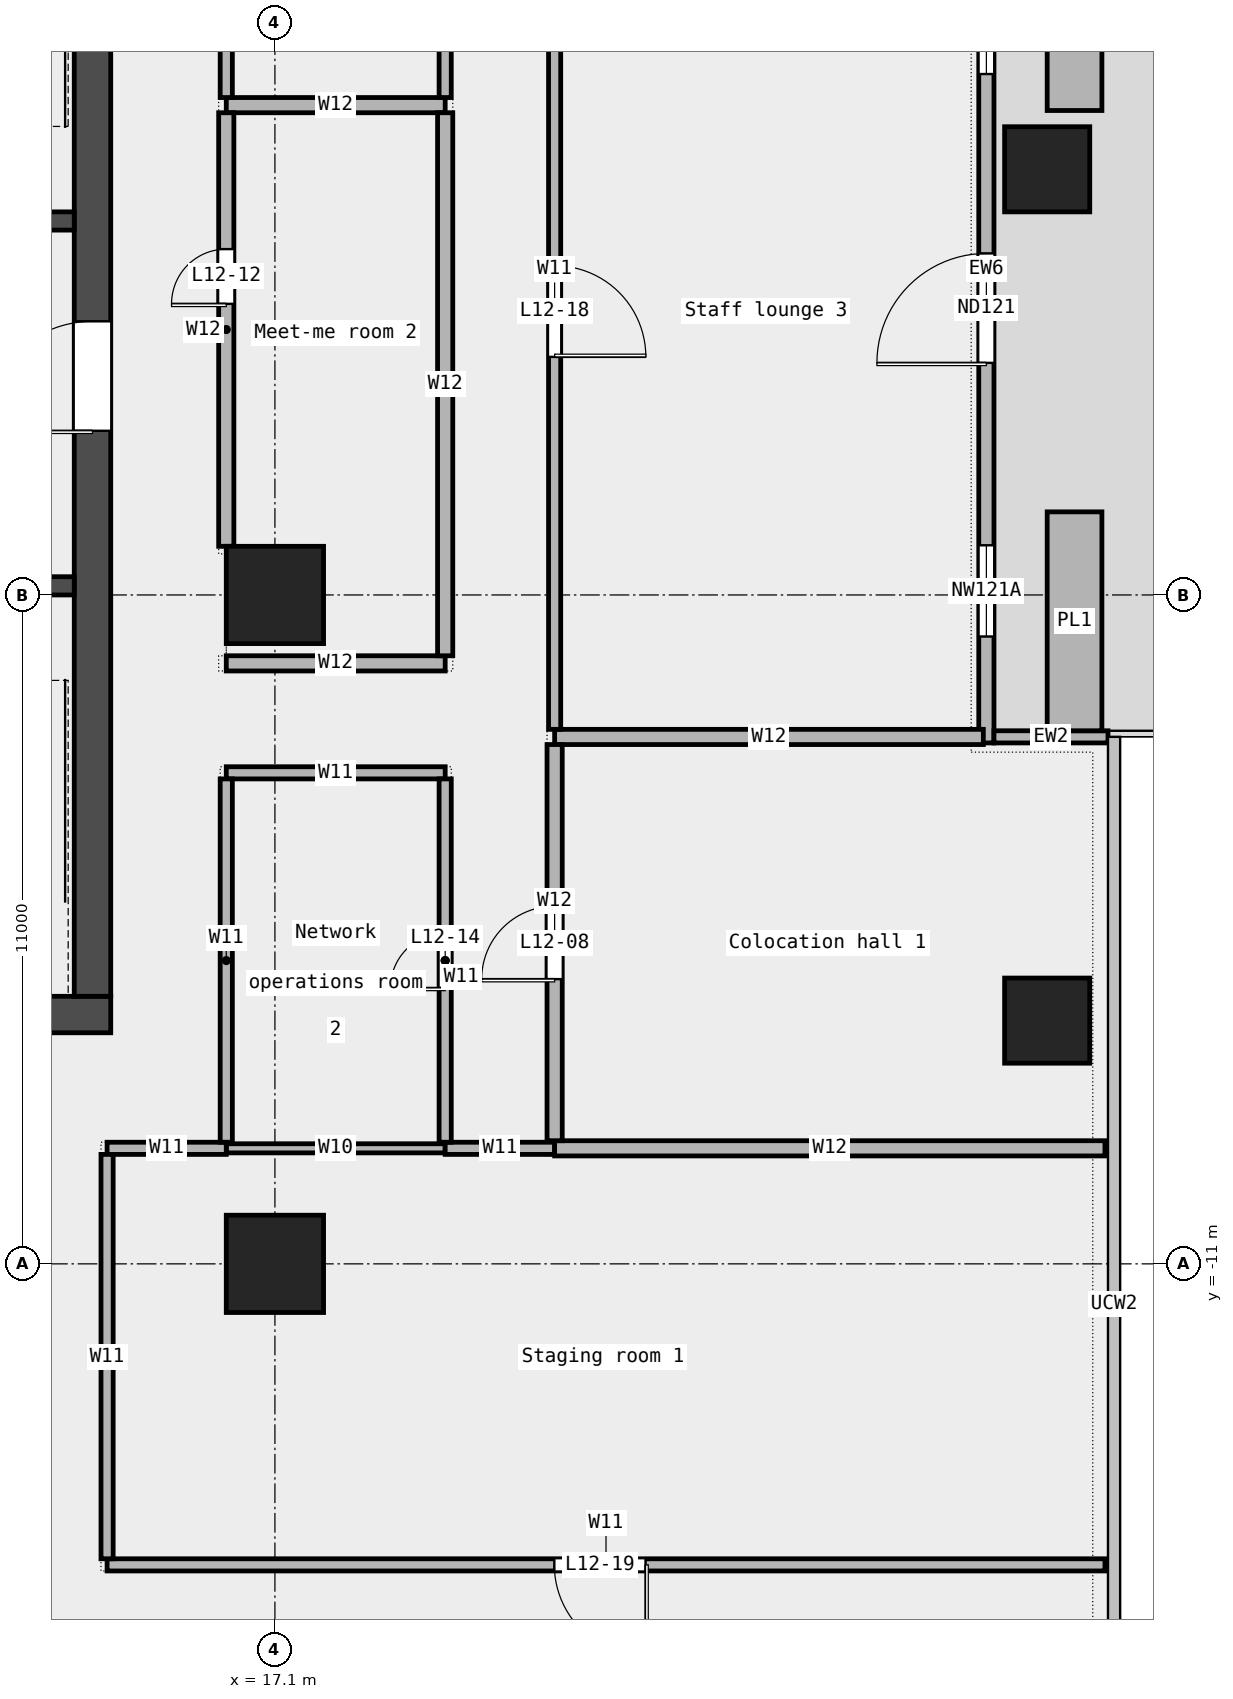
"""IFC4 building model, lengths in metres.
Left out: names, types, materials, properties, quantities, classifications, styles, units other than length and angle.
Written with IfcOpenShell. Run it as: python <this file> out.ifc"""

import sys

from ifc_helpers import new_model, si_unit, direction, frame, frame_2d, origin, origin_2d, place, context, subcontext, project, spatial, rectangle, extrude, element, fill, save


model = new_model("IFC4")
c1 = context("Model", 3, precision=1e-05, world=origin(), true_north=direction((0.0, 1.0)))
c2 = subcontext(c1, "Body", "Model", "MODEL_VIEW")
j1 = project(units=[si_unit("LENGTHUNIT", "METRE"), si_unit("PLANEANGLEUNIT", "RADIAN")], contexts=[c1])
p1 = place(None, origin())
s1 = spatial("IfcSite", under=j1, at=p1, CompositionType="ELEMENT")
p2 = place(p1, origin())
s2 = spatial("IfcBuilding", under=s1, at=p2, CompositionType="ELEMENT")
p3 = place(p2, frame((0.0, 0.0, 64.6)))
s3 = spatial("IfcBuildingStorey", under=s2, at=p3, CompositionType="ELEMENT", Elevation=64.6)
for number, where, z_axis, x_axis in (
    (1, (29.8, -7.0, 0.0), (0.0, 0.0, 1.0), (1.0, 0.0, 0.0)),
    (2, (29.8, 7.0, 0.0), (0.0, 0.0, 1.0), (1.0, 0.0, 0.0)),
):
    element("IfcColumn", number, at=place(p3, frame(where, z_axis=z_axis, x_axis=x_axis)), inside=s3, PredefinedType="COLUMN", context=c2, shape_type="SweptSolid", body=[
        extrude(rectangle(XDim=1.4, YDim=1.4, at=origin_2d()), origin(), (0.0, 0.0, 1.0), 4.35),
    ])
for number, where, z_axis, x_axis in (
    (3, (17.1, -11.0, 0.0), (0.0, 0.0, 1.0), (1.0, 0.0, 0.0)),
    (4, (17.1, 0.0, 0.0), (0.0, 0.0, 1.0), (1.0, 0.0, 0.0)),
):
    element("IfcColumn", number, at=place(p3, frame(where, z_axis=z_axis, x_axis=x_axis)), inside=s3, PredefinedType="COLUMN", context=c2, shape_type="SweptSolid", body=[
        extrude(rectangle(XDim=1.6, YDim=1.6, at=origin_2d()), origin(), (0.0, 0.0, 1.0), 4.35),
    ])
p4 = place(p3, frame((28.8, -2.433, 0.0), z_axis=(0.0, 0.0, 1.0), x_axis=(0.0, 1.0, 0.0)))
e5 = element("IfcWall", 5, at=p4, inside=s3, PredefinedType="STANDARD", context=c2, shape_type="SweptSolid", body=[
    extrude(rectangle(XDim=14.2, YDim=0.25, at=frame_2d((7.1, 0.0))), origin(), (0.0, 0.0, 1.0), 4.35),
])
p5 = place(p4, frame((1.75, 0.0, 0.45)))
e6 = element("IfcOpeningElement", 6, at=p5, cuts=e5, PredefinedType="OPENING", context=c2, shape_type="SweptSolid", body=[
    extrude(rectangle(XDim=1.5, YDim=3.0, at=frame_2d((0.75, 1.5))), frame((0.0, 0.137, 0.0), z_axis=(0.0, -1.0, 0.0), x_axis=(1.0, 0.0, 0.0)), (0.0, 0.0, 1.0), 0.274),
])
p6 = place(p4, frame((6.25, 0.0, 0.0)))
e7 = element("IfcOpeningElement", 7, at=p6, cuts=e5, PredefinedType="OPENING", context=c2, shape_type="SweptSolid", body=[
    extrude(rectangle(XDim=1.8, YDim=2.4, at=frame_2d((0.9, 1.2))), frame((0.0, 0.137, 0.0), z_axis=(0.0, -1.0, 0.0), x_axis=(1.0, 0.0, 0.0)), (0.0, 0.0, 1.0), 0.274),
])
p7 = place(p4, frame((11.0, 0.0, 0.45)))
e8 = element("IfcOpeningElement", 8, at=p7, cuts=e5, PredefinedType="OPENING", context=c2, shape_type="SweptSolid", body=[
    extrude(rectangle(XDim=1.5, YDim=3.0, at=frame_2d((0.75, 1.5))), frame((0.0, 0.137, 0.0), z_axis=(0.0, -1.0, 0.0), x_axis=(1.0, 0.0, 0.0)), (0.0, 0.0, 1.0), 0.274),
])
p8 = place(p3, frame((30.8, -2.333, 0.0), z_axis=(0.0, 0.0, 1.0), x_axis=(-1.0, 0.0, 0.0)))
e9 = element("IfcWall", 9, at=p8, inside=s3, PredefinedType="STANDARD", context=c2, shape_type="SweptSolid", body=[
    extrude(rectangle(XDim=1.875, YDim=0.2, at=frame_2d((0.938, 0.0))), origin(), (0.0, 0.0, 1.0), 4.35),
])
for number, where, z_axis, x_axis in (
    (10, (30.25, -2.233, 0.0), (0.0, 0.0, 1.0), (0.0, 1.0, 0.0)),
    (11, (30.25, 7.967, 0.0), (0.0, 0.0, 1.0), (0.0, 1.0, 0.0)),
):
    element("IfcWall", number, at=place(p3, frame(where, z_axis=z_axis, x_axis=x_axis)), inside=s3, PredefinedType="STANDARD", context=c2, shape_type="SweptSolid", body=[
        extrude(rectangle(XDim=3.6, YDim=0.9, at=frame_2d((1.8, 0.0))), origin(), (0.0, 0.0, 1.0), 0.7),
    ])
p9 = place(p3, frame((14.34, -15.95, 0.0), z_axis=(0.0, 0.0, 1.0), x_axis=(1.0, 0.0, 0.0)))
e12 = element("IfcWall", 12, at=p9, inside=s3, PredefinedType="PARTITIONING", context=c2, shape_type="SweptSolid", body=[
    extrude(rectangle(XDim=16.41, YDim=0.2, at=frame_2d((8.205, 0.0))), origin(), (0.0, 0.0, 1.0), 4.35),
])
p10 = place(p9, frame((7.355, 0.0, 0.0)))
e13 = element("IfcOpeningElement", 13, at=p10, cuts=e12, PredefinedType="OPENING", context=c2, shape_type="SweptSolid", body=[
    extrude(rectangle(XDim=1.5, YDim=2.1, at=frame_2d((0.75, 1.05))), frame((0.0, 0.112, 0.0), z_axis=(0.0, -1.0, 0.0), x_axis=(1.0, 0.0, 0.0)), (0.0, 0.0, 1.0), 0.224),
])
p11 = place(p3, frame((16.3, -9.1, 0.0), z_axis=(0.0, 0.0, 1.0), x_axis=(1.0, 0.0, 0.0)))
e14 = element("IfcWall", 14, at=p11, inside=s3, PredefinedType="PARTITIONING", context=c2, shape_type="SweptSolid", body=[
    extrude(rectangle(XDim=3.6, YDim=0.15, at=frame_2d((1.8, 0.0))), origin(), (0.0, 0.0, 1.0), 4.35),
])
p12 = place(p3, frame((14.34, -9.1, 0.0), z_axis=(0.0, 0.0, 1.0), x_axis=(1.0, 0.0, 0.0)))
e15 = element("IfcWall", 15, at=p12, inside=s3, PredefinedType="PARTITIONING", context=c2, shape_type="SweptSolid", body=[
    extrude(rectangle(XDim=1.96, YDim=0.2, at=frame_2d((0.98, 0.0))), origin(), (0.0, 0.0, 1.0), 4.35),
])
p13 = place(p3, frame((19.9, -9.1, 0.0), z_axis=(0.0, 0.0, 1.0), x_axis=(1.0, 0.0, 0.0)))
e16 = element("IfcWall", 16, at=p13, inside=s3, PredefinedType="PARTITIONING", context=c2, shape_type="SweptSolid", body=[
    extrude(rectangle(XDim=1.8, YDim=0.2, at=frame_2d((0.9, 0.0))), origin(), (0.0, 0.0, 1.0), 4.35),
])
p14 = place(p3, frame((21.7, -9.1, 0.0), z_axis=(0.0, 0.0, 1.0), x_axis=(1.0, 0.0, 0.0)))
e17 = element("IfcWall", 17, at=p14, inside=s3, PredefinedType="PARTITIONING", context=c2, shape_type="SweptSolid", body=[
    extrude(rectangle(XDim=9.05, YDim=0.25, at=frame_2d((4.525, 0.0))), origin(), (0.0, 0.0, 1.0), 4.35),
])
p15 = place(p3, frame((16.3, -2.925, 0.0), z_axis=(0.0, 0.0, 1.0), x_axis=(1.0, 0.0, 0.0)))
e18 = element("IfcWall", 18, at=p15, inside=s3, PredefinedType="PARTITIONING", context=c2, shape_type="SweptSolid", body=[
    extrude(rectangle(XDim=3.6, YDim=0.2, at=frame_2d((1.8, 0.0))), origin(), (0.0, 0.0, 1.0), 4.35),
])
p16 = place(p3, frame((21.7, -2.335, 0.0), z_axis=(0.0, 0.0, 1.0), x_axis=(1.0, 0.0, 0.0)))
e19 = element("IfcWall", 19, at=p16, inside=s3, PredefinedType="PARTITIONING", context=c2, shape_type="SweptSolid", body=[
    extrude(rectangle(XDim=7.05, YDim=0.25, at=frame_2d((3.525, 0.0))), origin(), (0.0, 0.0, 1.0), 4.35),
])
for number, where, z_axis, x_axis in (
    (20, (16.3, -1.125, 0.0), (0.0, 0.0, 1.0), (1.0, 0.0, 0.0)),
    (21, (16.3, 8.055, 0.0), (0.0, 0.0, 1.0), (1.0, 0.0, 0.0)),
):
    element("IfcWall", number, at=place(p3, frame(where, z_axis=z_axis, x_axis=x_axis)), inside=s3, PredefinedType="PARTITIONING", context=c2, shape_type="SweptSolid", body=[
        extrude(rectangle(XDim=3.6, YDim=0.25, at=frame_2d((1.8, 0.0))), origin(), (0.0, 0.0, 1.0), 4.35),
    ])
p17 = place(p3, frame((14.34, -15.85, 0.0), z_axis=(0.0, 0.0, 1.0), x_axis=(0.0, 1.0, 0.0)))
e22 = element("IfcWall", 22, at=p17, inside=s3, PredefinedType="PARTITIONING", context=c2, shape_type="SweptSolid", body=[
    extrude(rectangle(XDim=6.65, YDim=0.2, at=frame_2d((3.325, 0.0))), origin(), (0.0, 0.0, 1.0), 4.35),
])
p18 = place(p3, frame((16.3, -9.0, 0.0), z_axis=(0.0, 0.0, 1.0), x_axis=(0.0, 1.0, 0.0)))
e23 = element("IfcWall", 23, at=p18, inside=s3, PredefinedType="PARTITIONING", context=c2, shape_type="SweptSolid", body=[
    extrude(rectangle(XDim=5.975, YDim=0.2, at=frame_2d((2.988, 0.0))), origin(), (0.0, 0.0, 1.0), 4.35),
])
p19 = place(p3, frame((16.3, 8.18, 0.0), z_axis=(0.0, 0.0, 1.0), x_axis=(0.0, 1.0, 0.0)))
e24 = element("IfcWall", 24, at=p19, inside=s3, PredefinedType="PARTITIONING", context=c2, shape_type="SweptSolid", body=[
    extrude(rectangle(XDim=2.02, YDim=0.2, at=frame_2d((1.01, 0.0))), origin(), (0.0, 0.0, 1.0), 4.35),
])
p20 = place(p3, frame((16.3, 0.8, 0.0), z_axis=(0.0, 0.0, 1.0), x_axis=(0.0, 1.0, 0.0)))
e25 = element("IfcWall", 25, at=p20, inside=s3, PredefinedType="PARTITIONING", context=c2, shape_type="SweptSolid", body=[
    extrude(rectangle(XDim=7.13, YDim=0.25, at=frame_2d((3.565, 0.0))), origin(), (0.0, 0.0, 1.0), 4.35),
])
p21 = place(p20, frame((3.988, 0.0, 0.0)))
e26 = element("IfcOpeningElement", 26, at=p21, cuts=e25, PredefinedType="OPENING", context=c2, shape_type="SweptSolid", body=[
    extrude(rectangle(XDim=0.9, YDim=2.1, at=frame_2d((0.45, 1.05))), frame((0.0, 0.137, 0.0), z_axis=(0.0, -1.0, 0.0), x_axis=(1.0, 0.0, 0.0)), (0.0, 0.0, 1.0), 0.274),
])
p22 = place(p3, frame((19.9, -9.0, 0.0), z_axis=(0.0, 0.0, 1.0), x_axis=(0.0, 1.0, 0.0)))
e27 = element("IfcWall", 27, at=p22, inside=s3, PredefinedType="PARTITIONING", context=c2, shape_type="SweptSolid", body=[
    extrude(rectangle(XDim=5.975, YDim=0.2, at=frame_2d((2.988, 0.0))), origin(), (0.0, 0.0, 1.0), 4.35),
])
p23 = place(p22, frame((2.538, 0.0, 0.0)))
e28 = element("IfcOpeningElement", 28, at=p23, cuts=e27, PredefinedType="OPENING", context=c2, shape_type="SweptSolid", body=[
    extrude(rectangle(XDim=0.9, YDim=2.1, at=frame_2d((0.45, 1.05))), frame((0.0, 0.112, 0.0), z_axis=(0.0, -1.0, 0.0), x_axis=(1.0, 0.0, 0.0)), (0.0, 0.0, 1.0), 0.224),
])
p24 = place(p3, frame((19.9, 8.18, 0.0), z_axis=(0.0, 0.0, 1.0), x_axis=(0.0, 1.0, 0.0)))
e29 = element("IfcWall", 29, at=p24, inside=s3, PredefinedType="PARTITIONING", context=c2, shape_type="SweptSolid", body=[
    extrude(rectangle(XDim=7.095, YDim=0.2, at=frame_2d((3.547, 0.0))), origin(), (0.0, 0.0, 1.0), 4.35),
])
p25 = place(p24, frame((3.097, 0.0, 0.0)))
e30 = element("IfcOpeningElement", 30, at=p25, cuts=e29, PredefinedType="OPENING", context=c2, shape_type="SweptSolid", body=[
    extrude(rectangle(XDim=0.9, YDim=2.1, at=frame_2d((0.45, 1.05))), frame((0.0, 0.112, 0.0), z_axis=(0.0, -1.0, 0.0), x_axis=(1.0, 0.0, 0.0)), (0.0, 0.0, 1.0), 0.224),
])
p26 = place(p3, frame((19.9, -1.0, 0.0), z_axis=(0.0, 0.0, 1.0), x_axis=(0.0, 1.0, 0.0)))
e31 = element("IfcWall", 31, at=p26, inside=s3, PredefinedType="PARTITIONING", context=c2, shape_type="SweptSolid", body=[
    extrude(rectangle(XDim=8.93, YDim=0.25, at=frame_2d((4.465, 0.0))), origin(), (0.0, 0.0, 1.0), 4.35),
])
p27 = place(p3, frame((21.7, -2.21, 0.0), z_axis=(0.0, 0.0, 1.0), x_axis=(0.0, 1.0, 0.0)))
e32 = element("IfcWall", 32, at=p27, inside=s3, PredefinedType="PARTITIONING", context=c2, shape_type="SweptSolid", body=[
    extrude(rectangle(XDim=13.75, YDim=0.2, at=frame_2d((6.875, 0.0))), origin(), (0.0, 0.0, 1.0), 4.35),
])
p28 = place(p27, frame((6.125, 0.0, 0.0)))
e33 = element("IfcOpeningElement", 33, at=p28, cuts=e32, PredefinedType="OPENING", context=c2, shape_type="SweptSolid", body=[
    extrude(rectangle(XDim=1.5, YDim=2.1, at=frame_2d((0.75, 1.05))), frame((0.0, 0.112, 0.0), z_axis=(0.0, -1.0, 0.0), x_axis=(1.0, 0.0, 0.0)), (0.0, 0.0, 1.0), 0.224),
])
p29 = place(p3, frame((21.7, -8.975, 0.0), z_axis=(0.0, 0.0, 1.0), x_axis=(0.0, 1.0, 0.0)))
e34 = element("IfcWall", 34, at=p29, inside=s3, PredefinedType="PARTITIONING", context=c2, shape_type="SweptSolid", body=[
    extrude(rectangle(XDim=6.515, YDim=0.25, at=frame_2d((3.258, 0.0))), origin(), (0.0, 0.0, 1.0), 4.35),
])
p30 = place(p29, frame((2.657, 0.0, 0.0)))
e35 = element("IfcOpeningElement", 35, at=p30, cuts=e34, PredefinedType="OPENING", context=c2, shape_type="SweptSolid", body=[
    extrude(rectangle(XDim=1.2, YDim=2.1, at=frame_2d((0.6, 1.05))), frame((0.0, 0.137, 0.0), z_axis=(0.0, -1.0, 0.0), x_axis=(1.0, 0.0, 0.0)), (0.0, 0.0, 1.0), 0.274),
])
p31 = place(p3, frame((-14.4, -6.9, 0.0), z_axis=(0.0, 0.0, 1.0), x_axis=(1.0, 0.0, 0.0)))
e36 = element("IfcWall", 36, at=p31, inside=s3, PredefinedType="SHEAR", context=c2, shape_type="SweptSolid", body=[
    extrude(rectangle(XDim=28.8, YDim=0.6, at=frame_2d((14.4, 0.0))), origin(), (0.0, 0.0, 1.0), 4.5),
])
p32 = place(p31, frame((4.337, 0.0, 0.0)))
e37 = element("IfcOpeningElement", 37, at=p32, cuts=e36, PredefinedType="OPENING", context=c2, shape_type="SweptSolid", body=[
    extrude(rectangle(XDim=1.0, YDim=2.1, at=frame_2d((0.5, 1.05))), frame((0.0, 0.312, 0.0), z_axis=(0.0, -1.0, 0.0), x_axis=(1.0, 0.0, 0.0)), (0.0, 0.0, 1.0), 0.624),
])
p33 = place(p31, frame((6.212, 0.0, 0.0)))
e38 = element("IfcOpeningElement", 38, at=p33, cuts=e36, PredefinedType="OPENING", context=c2, shape_type="SweptSolid", body=[
    extrude(rectangle(XDim=1.0, YDim=2.1, at=frame_2d((0.5, 1.05))), frame((0.0, 0.312, 0.0), z_axis=(0.0, -1.0, 0.0), x_axis=(1.0, 0.0, 0.0)), (0.0, 0.0, 1.0), 0.624),
])
p34 = place(p31, frame((10.8, 0.0, 0.0)))
e39 = element("IfcOpeningElement", 39, at=p34, cuts=e36, PredefinedType="OPENING", context=c2, shape_type="SweptSolid", body=[
    extrude(rectangle(XDim=1.2, YDim=2.1, at=frame_2d((0.6, 1.05))), frame((0.0, 0.312, 0.0), z_axis=(0.0, -1.0, 0.0), x_axis=(1.0, 0.0, 0.0)), (0.0, 0.0, 1.0), 0.624),
])
p35 = place(p31, frame((15.587, 0.0, 0.0)))
e40 = element("IfcOpeningElement", 40, at=p35, cuts=e36, PredefinedType="OPENING", context=c2, shape_type="SweptSolid", body=[
    extrude(rectangle(XDim=1.0, YDim=2.1, at=frame_2d((0.5, 1.05))), frame((0.0, 0.312, 0.0), z_axis=(0.0, -1.0, 0.0), x_axis=(1.0, 0.0, 0.0)), (0.0, 0.0, 1.0), 0.624),
])
p36 = place(p31, frame((18.75, 0.0, 0.0)))
e41 = element("IfcOpeningElement", 41, at=p36, cuts=e36, PredefinedType="OPENING", context=c2, shape_type="SweptSolid", body=[
    extrude(rectangle(XDim=1.8, YDim=2.1, at=frame_2d((0.9, 1.05))), frame((0.0, 0.312, 0.0), z_axis=(0.0, -1.0, 0.0), x_axis=(1.0, 0.0, 0.0)), (0.0, 0.0, 1.0), 0.624),
])
p37 = place(p31, frame((23.087, 0.0, 0.0)))
e42 = element("IfcOpeningElement", 42, at=p37, cuts=e36, PredefinedType="OPENING", context=c2, shape_type="SweptSolid", body=[
    extrude(rectangle(XDim=1.0, YDim=2.1, at=frame_2d((0.5, 1.05))), frame((0.0, 0.312, 0.0), z_axis=(0.0, -1.0, 0.0), x_axis=(1.0, 0.0, 0.0)), (0.0, 0.0, 1.0), 0.624),
])
p38 = place(p3, frame((14.1, -6.6, 0.0), z_axis=(0.0, 0.0, 1.0), x_axis=(0.0, 1.0, 0.0)))
e43 = element("IfcWall", 43, at=p38, inside=s3, PredefinedType="SHEAR", context=c2, shape_type="SweptSolid", body=[
    extrude(rectangle(XDim=19.5, YDim=0.6, at=frame_2d((9.75, 0.0))), origin(), (0.0, 0.0, 1.0), 4.5),
])
p39 = place(p38, frame((9.3, 0.0, 0.0)))
e44 = element("IfcOpeningElement", 44, at=p39, cuts=e43, PredefinedType="OPENING", context=c2, shape_type="SweptSolid", body=[
    extrude(rectangle(XDim=1.8, YDim=2.1, at=frame_2d((0.9, 1.05))), frame((0.0, 0.312, 0.0), z_axis=(0.0, -1.0, 0.0), x_axis=(1.0, 0.0, 0.0)), (0.0, 0.0, 1.0), 0.624),
])
p40 = place(p3, frame((10.65, 0.15, 0.0), z_axis=(0.0, 0.0, 1.0), x_axis=(1.0, 0.0, 0.0)))
e45 = element("IfcWall", 45, at=p40, inside=s3, PredefinedType="SOLIDWALL", context=c2, shape_type="SweptSolid", body=[
    extrude(rectangle(XDim=3.15, YDim=0.3, at=frame_2d((1.575, 0.0))), origin(), (0.0, 0.0, 1.0), 4.5),
])
p41 = place(p40, frame((1.025, 0.0, 0.0)))
e46 = element("IfcOpeningElement", 46, at=p41, cuts=e45, PredefinedType="OPENING", context=c2, shape_type="SweptSolid", body=[
    extrude(rectangle(XDim=1.1, YDim=2.1, at=frame_2d((0.55, 1.05))), frame((0.0, 0.162, 0.0), z_axis=(0.0, -1.0, 0.0), x_axis=(1.0, 0.0, 0.0)), (0.0, 0.0, 1.0), 0.324),
])
p42 = place(p3, frame((10.65, 6.15, 0.0), z_axis=(0.0, 0.0, 1.0), x_axis=(1.0, 0.0, 0.0)))
e47 = element("IfcWall", 47, at=p42, inside=s3, PredefinedType="SOLIDWALL", context=c2, shape_type="SweptSolid", body=[
    extrude(rectangle(XDim=3.15, YDim=0.3, at=frame_2d((1.575, 0.0))), origin(), (0.0, 0.0, 1.0), 4.5),
])
p43 = place(p42, frame((1.025, 0.0, 0.0)))
e48 = element("IfcOpeningElement", 48, at=p43, cuts=e47, PredefinedType="OPENING", context=c2, shape_type="SweptSolid", body=[
    extrude(rectangle(XDim=1.1, YDim=2.1, at=frame_2d((0.55, 1.05))), frame((0.0, 0.162, 0.0), z_axis=(0.0, -1.0, 0.0), x_axis=(1.0, 0.0, 0.0)), (0.0, 0.0, 1.0), 0.324),
])
p44 = place(p5, origin())
e49 = element("IfcWindow", 49, at=p44, inside=s3, PartitioningType="SINGLE_PANEL", PredefinedType="WINDOW", context=c2, shape_type="SweptSolid", body=[
    extrude(rectangle(XDim=1.5, YDim=3.0, at=frame_2d((0.75, 1.5))), frame((0.0, 0.03, 0.0), z_axis=(0.0, -1.0, 0.0), x_axis=(1.0, 0.0, 0.0)), (0.0, 0.0, 1.0), 0.06),
])
fill(e6, e49)
p45 = place(p6, origin())
e50 = element("IfcDoor", 50, at=p45, inside=s3, OperationType="DOUBLE_DOOR_SINGLE_SWING", PredefinedType="DOOR", context=c2, shape_type="SweptSolid", body=[
    extrude(rectangle(XDim=1.8, YDim=2.4, at=frame_2d((0.9, 1.2))), frame((0.0, 0.025, 0.0), z_axis=(0.0, -1.0, 0.0), x_axis=(1.0, 0.0, 0.0)), (0.0, 0.0, 1.0), 0.05),
])
fill(e7, e50)
p46 = place(p7, origin())
e51 = element("IfcWindow", 51, at=p46, inside=s3, PartitioningType="SINGLE_PANEL", PredefinedType="WINDOW", context=c2, shape_type="SweptSolid", body=[
    extrude(rectangle(XDim=1.5, YDim=3.0, at=frame_2d((0.75, 1.5))), frame((0.0, 0.03, 0.0), z_axis=(0.0, -1.0, 0.0), x_axis=(1.0, 0.0, 0.0)), (0.0, 0.0, 1.0), 0.06),
])
fill(e8, e51)
p47 = place(p30, origin())
e52 = element("IfcDoor", 52, at=p47, inside=s3, OperationType="SINGLE_SWING_LEFT", PredefinedType="DOOR", context=c2, shape_type="SweptSolid", body=[
    extrude(rectangle(XDim=1.2, YDim=2.1, at=frame_2d((0.6, 1.05))), frame((0.0, 0.025, 0.0), z_axis=(0.0, -1.0, 0.0), x_axis=(1.0, 0.0, 0.0)), (0.0, 0.0, 1.0), 0.05),
])
fill(e35, e52)
p48 = place(p21, origin())
e53 = element("IfcDoor", 53, at=p48, inside=s3, OperationType="SINGLE_SWING_LEFT", PredefinedType="DOOR", context=c2, shape_type="SweptSolid", body=[
    extrude(rectangle(XDim=0.9, YDim=2.1, at=frame_2d((0.45, 1.05))), frame((0.0, 0.025, 0.0), z_axis=(0.0, -1.0, 0.0), x_axis=(1.0, 0.0, 0.0)), (0.0, 0.0, 1.0), 0.05),
])
fill(e26, e53)
p49 = place(p23, origin())
e54 = element("IfcDoor", 54, at=p49, inside=s3, OperationType="SINGLE_SWING_LEFT", PredefinedType="DOOR", context=c2, shape_type="SweptSolid", body=[
    extrude(rectangle(XDim=0.9, YDim=2.1, at=frame_2d((0.45, 1.05))), frame((0.0, 0.025, 0.0), z_axis=(0.0, -1.0, 0.0), x_axis=(1.0, 0.0, 0.0)), (0.0, 0.0, 1.0), 0.05),
])
fill(e28, e54)
p50 = place(p28, origin())
e55 = element("IfcDoor", 55, at=p50, inside=s3, OperationType="DOUBLE_DOOR_SINGLE_SWING", PredefinedType="DOOR", context=c2, shape_type="SweptSolid", body=[
    extrude(rectangle(XDim=1.5, YDim=2.1, at=frame_2d((0.75, 1.05))), frame((0.0, 0.025, 0.0), z_axis=(0.0, -1.0, 0.0), x_axis=(1.0, 0.0, 0.0)), (0.0, 0.0, 1.0), 0.05),
])
fill(e33, e55)
p51 = place(p10, origin())
e56 = element("IfcDoor", 56, at=p51, inside=s3, OperationType="DOUBLE_DOOR_SINGLE_SWING", PredefinedType="DOOR", context=c2, shape_type="SweptSolid", body=[
    extrude(rectangle(XDim=1.5, YDim=2.1, at=frame_2d((0.75, 1.05))), frame((0.0, 0.025, 0.0), z_axis=(0.0, -1.0, 0.0), x_axis=(1.0, 0.0, 0.0)), (0.0, 0.0, 1.0), 0.05),
])
fill(e13, e56)
p52 = place(p39, origin())
e57 = element("IfcDoor", 57, at=p52, inside=s3, OperationType="DOUBLE_DOOR_SINGLE_SWING", PredefinedType="DOOR", context=c2, shape_type="SweptSolid", body=[
    extrude(rectangle(XDim=1.8, YDim=2.1, at=frame_2d((0.9, 1.05))), frame((0.0, 0.025, 0.0), z_axis=(0.0, -1.0, 0.0), x_axis=(1.0, 0.0, 0.0)), (0.0, 0.0, 1.0), 0.05),
])
fill(e44, e57)
save(model, sys.argv[1])
